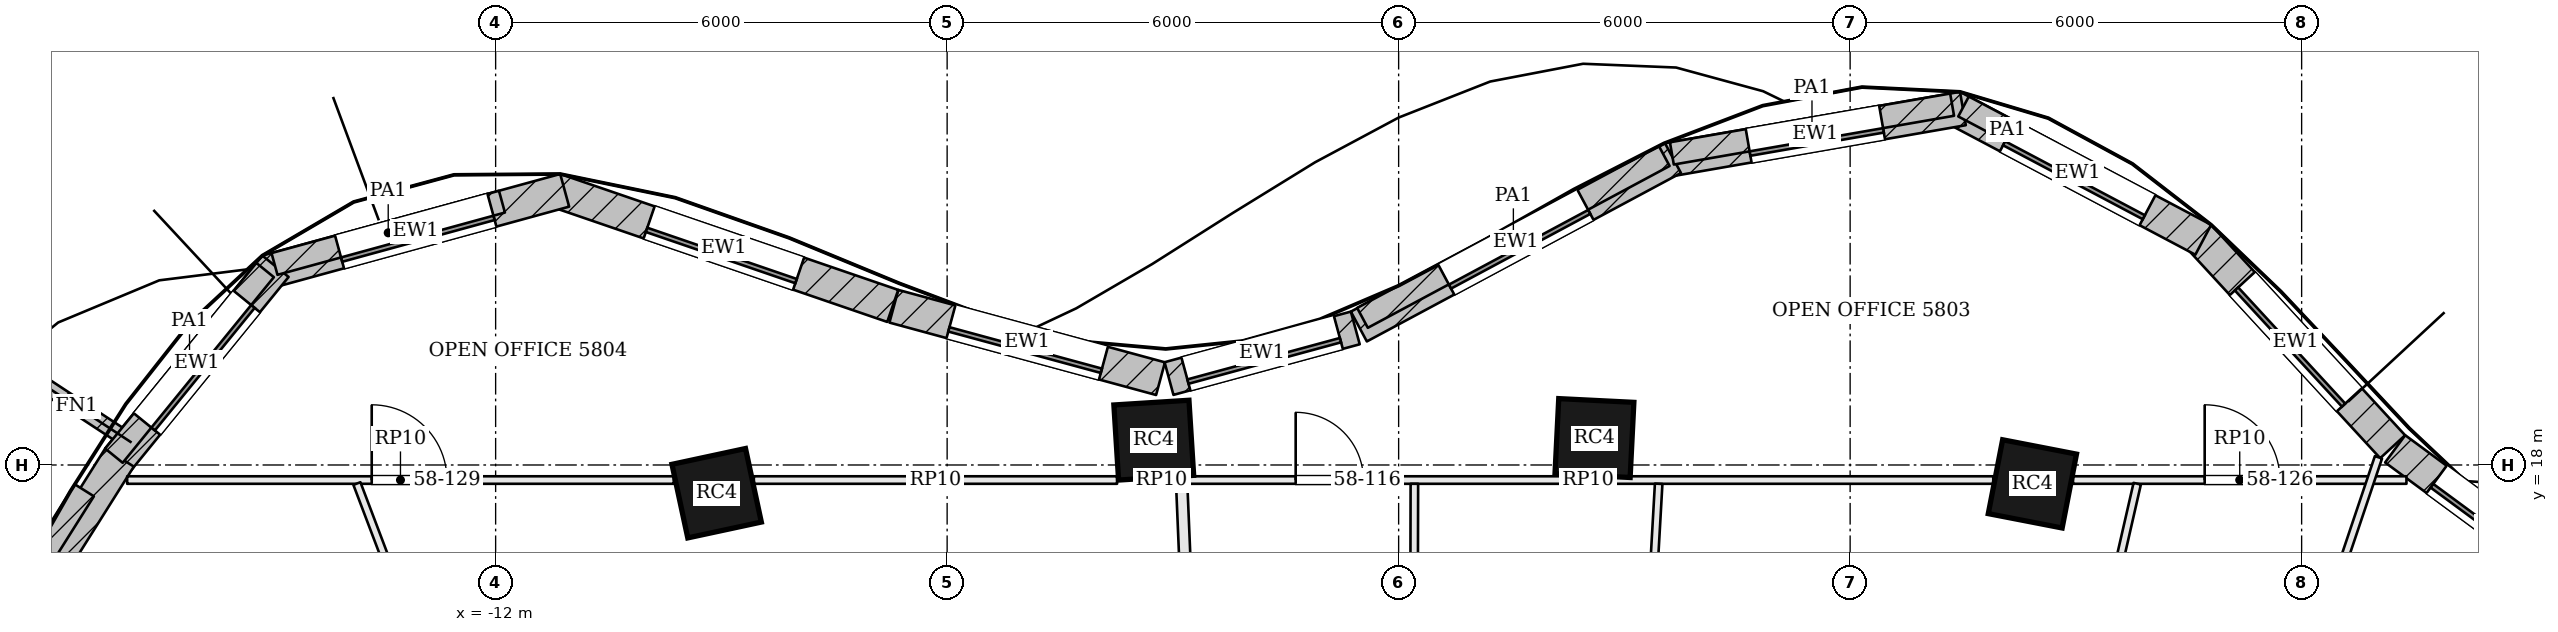
"""IFC4 building model, lengths in metres.
Left out: names, types, materials, properties, quantities, classifications, styles, units other than length and angle.
Written with IfcOpenShell. Run it as: python <this file> out.ifc"""

import sys

from ifc_helpers import new_model, si_unit, direction, frame, frame_2d, origin, origin_2d, place, context, subcontext, project, spatial, rectangle, extrude, element, fill, save


model = new_model("IFC4")
c1 = context("Model", 3, precision=1e-05, world=origin(), true_north=direction((0.0, 1.0)))
c2 = subcontext(c1, "Body", "Model", "MODEL_VIEW")
j1 = project(units=[si_unit("LENGTHUNIT", "METRE"), si_unit("PLANEANGLEUNIT", "RADIAN")], contexts=[c1])
p1 = place(None, origin())
s1 = spatial("IfcSite", under=j1, at=p1, CompositionType="ELEMENT")
p2 = place(p1, origin())
s2 = spatial("IfcBuilding", under=s1, at=p2, CompositionType="ELEMENT")
p3 = place(p2, frame((0.0, 0.0, 237.0)))
s3 = spatial("IfcBuildingStorey", under=s2, at=p3, CompositionType="ELEMENT", Elevation=237.0)
for number, where, z_axis, x_axis in (
    (1, (8.422, 17.749, 0.0), (0.0, 0.0, 1.0), (-0.982, 0.191, 0.0)),
    (2, (2.602, 18.358, 0.0), (0.0, 0.0, 1.0), (-0.999, 0.05, 0.0)),
    (3, (-3.254, 18.33, 0.0), (0.0, 0.0, 1.0), (-0.998, -0.063, 0.0)),
    (4, (-9.063, 17.625, 0.0), (0.0, 0.0, 1.0), (-0.978, -0.21, 0.0)),
):
    element("IfcColumn", number, at=place(p3, frame(where, z_axis=z_axis, x_axis=x_axis)), inside=s3, PredefinedType="COLUMN", context=c2, shape_type="SweptSolid", body=[
        extrude(rectangle(XDim=1.0, YDim=1.0, at=origin_2d()), origin(), (0.0, 0.0, 1.0), 3.9),
    ])
p4 = place(p3, frame((16.036, 16.158, 0.0), z_axis=(0.0, 0.0, 1.0), x_axis=(-0.805181432967, 0.593028549064, 0.0)))
e5 = element("IfcWall", 5, at=p4, inside=s3, PredefinedType="SOLIDWALL", context=c2, shape_type="SweptSolid", body=[
    extrude(rectangle(XDim=3.469, YDim=0.45, at=frame_2d((1.734, 0.0))), origin(), (0.0, 0.0, 1.0), 3.7),
])
p5 = place(p4, frame((0.684, 0.0, 0.9)))
e6 = element("IfcOpeningElement", 6, at=p5, cuts=e5, PredefinedType="OPENING", context=c2, shape_type="SweptSolid", body=[
    extrude(rectangle(XDim=2.1, YDim=2.3, at=frame_2d((1.05, 1.15))), frame((0.0, 0.235, 0.0), z_axis=(0.0, -1.0, 0.0), x_axis=(1.0, 0.0, 0.0)), (0.0, 0.0, 1.0), 0.47),
])
p6 = place(p3, frame((13.209, 18.243, 0.0), z_axis=(0.0, 0.0, 1.0), x_axis=(-0.677612152497, 0.735419452278, 0.0)))
e7 = element("IfcWall", 7, at=p6, inside=s3, PredefinedType="SOLIDWALL", context=c2, shape_type="SweptSolid", body=[
    extrude(rectangle(XDim=3.797, YDim=0.45, at=frame_2d((1.898, 0.0))), origin(), (0.0, 0.0, 1.0), 3.7),
])
p7 = place(p6, frame((0.848, 0.0, 0.9)))
e8 = element("IfcOpeningElement", 8, at=p7, cuts=e7, PredefinedType="OPENING", context=c2, shape_type="SweptSolid", body=[
    extrude(rectangle(XDim=2.1, YDim=2.3, at=frame_2d((1.05, 1.15))), frame((0.0, 0.235, 0.0), z_axis=(0.0, -1.0, 0.0), x_axis=(1.0, 0.0, 0.0)), (0.0, 0.0, 1.0), 0.47),
])
p8 = place(p3, frame((10.693, 20.993, 0.0), z_axis=(0.0, 0.0, 1.0), x_axis=(-0.883817790726, 0.46783128668, 0.0)))
e9 = element("IfcWall", 9, at=p8, inside=s3, PredefinedType="SOLIDWALL", context=c2, shape_type="SweptSolid", body=[
    extrude(rectangle(XDim=3.777, YDim=0.45, at=frame_2d((1.888, 0.0))), origin(), (0.0, 0.0, 1.0), 3.7),
])
p9 = place(p8, frame((0.838, 0.0, 0.9)))
e10 = element("IfcOpeningElement", 10, at=p9, cuts=e9, PredefinedType="OPENING", context=c2, shape_type="SweptSolid", body=[
    extrude(rectangle(XDim=2.1, YDim=2.3, at=frame_2d((1.05, 1.15))), frame((0.0, 0.235, 0.0), z_axis=(0.0, -1.0, 0.0), x_axis=(1.0, 0.0, 0.0)), (0.0, 0.0, 1.0), 0.47),
])
p10 = place(p3, frame((7.499, 22.737, 0.0), z_axis=(0.0, 0.0, 1.0), x_axis=(-0.98521220506, -0.171338585849, 0.0)))
e11 = element("IfcWall", 11, at=p10, inside=s3, PredefinedType="SOLIDWALL", context=c2, shape_type="SweptSolid", body=[
    extrude(rectangle(XDim=3.98, YDim=0.45, at=frame_2d((1.99, 0.0))), origin(), (0.0, 0.0, 1.0), 3.7),
])
p11 = place(p10, frame((1.09, 0.0, 0.9)))
e12 = element("IfcOpeningElement", 12, at=p11, cuts=e11, PredefinedType="OPENING", context=c2, shape_type="SweptSolid", body=[
    extrude(rectangle(XDim=1.8, YDim=2.3, at=frame_2d((0.9, 1.15))), frame((0.0, 0.235, 0.0), z_axis=(0.0, -1.0, 0.0), x_axis=(1.0, 0.0, 0.0)), (0.0, 0.0, 1.0), 0.47),
])
p12 = place(p3, frame((3.646, 22.079, 0.0), z_axis=(0.0, 0.0, 1.0), x_axis=(-0.881279133897, -0.472596115259, 0.0)))
e13 = element("IfcWall", 13, at=p12, inside=s3, PredefinedType="SOLIDWALL", context=c2, shape_type="SweptSolid", body=[
    extrude(rectangle(XDim=4.737, YDim=0.45, at=frame_2d((2.368, 0.0))), origin(), (0.0, 0.0, 1.0), 3.7),
])
p13 = place(p12, frame((1.318, 0.0, 0.9)))
e14 = element("IfcOpeningElement", 14, at=p13, cuts=e13, PredefinedType="OPENING", context=c2, shape_type="SweptSolid", body=[
    extrude(rectangle(XDim=2.1, YDim=2.3, at=frame_2d((1.05, 1.15))), frame((0.0, 0.235, 0.0), z_axis=(0.0, -1.0, 0.0), x_axis=(1.0, 0.0, 0.0)), (0.0, 0.0, 1.0), 0.47),
])
p14 = place(p3, frame((-0.576, 19.821, 0.0), z_axis=(0.0, 0.0, 1.0), x_axis=(-0.965009398019, -0.262215296532, 0.0)))
e15 = element("IfcWall", 15, at=p14, inside=s3, PredefinedType="SOLIDWALL", context=c2, shape_type="SweptSolid", body=[
    extrude(rectangle(XDim=2.565, YDim=0.45, at=frame_2d((1.283, 0.0))), origin(), (0.0, 0.0, 1.0), 3.7),
])
p15 = place(p14, frame((0.233, 0.0, 0.9)))
e16 = element("IfcOpeningElement", 16, at=p15, cuts=e15, PredefinedType="OPENING", context=c2, shape_type="SweptSolid", body=[
    extrude(rectangle(XDim=2.1, YDim=2.3, at=frame_2d((1.05, 1.15))), frame((0.0, 0.235, 0.0), z_axis=(0.0, -1.0, 0.0), x_axis=(1.0, 0.0, 0.0)), (0.0, 0.0, 1.0), 0.47),
])
p16 = place(p3, frame((-3.164, 19.147, 0.0), z_axis=(0.0, 0.0, 1.0), x_axis=(-0.965039479998, 0.262104563191, 0.0)))
e17 = element("IfcWall", 17, at=p16, inside=s3, PredefinedType="SOLIDWALL", context=c2, shape_type="SweptSolid", body=[
    extrude(rectangle(XDim=3.672, YDim=0.45, at=frame_2d((1.836, 0.0))), origin(), (0.0, 0.0, 1.0), 3.7),
])
p17 = place(p16, frame((0.786, 0.0, 0.9)))
e18 = element("IfcOpeningElement", 18, at=p17, cuts=e17, PredefinedType="OPENING", context=c2, shape_type="SweptSolid", body=[
    extrude(rectangle(XDim=2.1, YDim=2.3, at=frame_2d((1.05, 1.15))), frame((0.0, 0.235, 0.0), z_axis=(0.0, -1.0, 0.0), x_axis=(1.0, 0.0, 0.0)), (0.0, 0.0, 1.0), 0.47),
])
p18 = place(p3, frame((-6.723, 20.114, 0.0), z_axis=(0.0, 0.0, 1.0), x_axis=(-0.945947299026, 0.324320377815, 0.0)))
e19 = element("IfcWall", 19, at=p18, inside=s3, PredefinedType="SOLIDWALL", context=c2, shape_type="SweptSolid", body=[
    extrude(rectangle(XDim=4.745, YDim=0.45, at=frame_2d((2.372, 0.0))), origin(), (0.0, 0.0, 1.0), 3.7),
])
p19 = place(p18, frame((1.322, 0.0, 0.9)))
e20 = element("IfcOpeningElement", 20, at=p19, cuts=e19, PredefinedType="OPENING", context=c2, shape_type="SweptSolid", body=[
    extrude(rectangle(XDim=2.1, YDim=2.3, at=frame_2d((1.05, 1.15))), frame((0.0, 0.235, 0.0), z_axis=(0.0, -1.0, 0.0), x_axis=(1.0, 0.0, 0.0)), (0.0, 0.0, 1.0), 0.47),
])
p20 = place(p3, frame((-11.083, 21.65, 0.0), z_axis=(0.0, 0.0, 1.0), x_axis=(-0.964483204983, -0.264144179011, 0.0)))
e21 = element("IfcWall", 21, at=p20, inside=s3, PredefinedType="SOLIDWALL", context=c2, shape_type="SweptSolid", body=[
    extrude(rectangle(XDim=4.104, YDim=0.45, at=frame_2d((2.052, 0.0))), origin(), (0.0, 0.0, 1.0), 3.7),
])
p21 = place(p20, frame((1.002, 0.0, 0.9)))
e22 = element("IfcOpeningElement", 22, at=p21, cuts=e21, PredefinedType="OPENING", context=c2, shape_type="SweptSolid", body=[
    extrude(rectangle(XDim=2.1, YDim=2.3, at=frame_2d((1.05, 1.15))), frame((0.0, 0.235, 0.0), z_axis=(0.0, -1.0, 0.0), x_axis=(1.0, 0.0, 0.0)), (0.0, 0.0, 1.0), 0.47),
])
p22 = place(p3, frame((-14.926, 20.641, 0.0), z_axis=(0.0, 0.0, 1.0), x_axis=(-0.631548074669, -0.775336720001, 0.0)))
e23 = element("IfcWall", 23, at=p22, inside=s3, PredefinedType="SOLIDWALL", context=c2, shape_type="SweptSolid", body=[
    extrude(rectangle(XDim=3.308, YDim=0.45, at=frame_2d((1.654, 0.0))), origin(), (0.0, 0.0, 1.0), 3.7),
])
p23 = place(p22, frame((0.604, 0.0, 0.9)))
e24 = element("IfcOpeningElement", 24, at=p23, cuts=e23, PredefinedType="OPENING", context=c2, shape_type="SweptSolid", body=[
    extrude(rectangle(XDim=2.1, YDim=2.3, at=frame_2d((1.05, 1.15))), frame((0.0, 0.235, 0.0), z_axis=(0.0, -1.0, 0.0), x_axis=(1.0, 0.0, 0.0)), (0.0, 0.0, 1.0), 0.47),
])
p24 = place(p3, frame((-16.998, 18.099, 0.0), z_axis=(0.0, 0.0, 1.0), x_axis=(-0.532745661304, -0.846275404559, 0.0)))
e25 = element("IfcWall", 25, at=p24, inside=s3, PredefinedType="SOLIDWALL", context=c2, shape_type="SweptSolid", body=[
    extrude(rectangle(XDim=5.076, YDim=0.45, at=frame_2d((2.538, 0.0))), origin(), (0.0, 0.0, 1.0), 3.7),
])
p25 = place(p24, frame((1.638, 0.0, 0.9)))
e26 = element("IfcOpeningElement", 26, at=p25, cuts=e25, PredefinedType="OPENING", context=c2, shape_type="SweptSolid", body=[
    extrude(rectangle(XDim=1.8, YDim=2.3, at=frame_2d((0.9, 1.15))), frame((0.0, 0.235, 0.0), z_axis=(0.0, -1.0, 0.0), x_axis=(1.0, 0.0, 0.0)), (0.0, 0.0, 1.0), 0.47),
])
p26 = place(p3, frame((-16.838, 18.298, 0.0), z_axis=(0.0, 0.0, 1.0), x_axis=(-0.835871900419, 0.548924554097, 0.0)))
e27 = element("IfcWall", 27, at=p26, inside=s3, PredefinedType="SOLIDWALL", context=c2, shape_type="SweptSolid", body=[
    extrude(rectangle(XDim=1.75, YDim=0.2, at=frame_2d((0.875, 0.0))), origin(), (0.0, 0.0, 1.0), 3.7),
])
p27 = place(p3, frame((8.682, 22.143, 3.9), z_axis=(0.0, 0.0, 1.0), x_axis=(-0.883787916347, 0.467887720419, 0.0)))
e28 = element("IfcWall", 28, at=p27, inside=s3, PredefinedType="PARAPET", context=c2, shape_type="SweptSolid", body=[
    extrude(rectangle(XDim=1.329, YDim=0.3, at=frame_2d((0.665, 0.0))), origin(), (0.0, 0.0, 1.0), 1.1),
])
p28 = place(p3, frame((7.355, 22.789, 3.9), z_axis=(0.0, 0.0, 1.0), x_axis=(-0.985197529684, -0.171422949176, 0.0)))
e29 = element("IfcWall", 29, at=p28, inside=s3, PredefinedType="PARAPET", context=c2, shape_type="SweptSolid", body=[
    extrude(rectangle(XDim=3.78, YDim=0.3, at=frame_2d((1.89, 0.0))), origin(), (0.0, 0.0, 1.0), 1.1),
])
p29 = place(p3, frame((3.53, 22.106, 3.9), z_axis=(0.0, 0.0, 1.0), x_axis=(-0.881258931682, -0.472633785643, 0.0)))
e30 = element("IfcWall", 30, at=p29, inside=s3, PredefinedType="PARAPET", context=c2, shape_type="SweptSolid", body=[
    extrude(rectangle(XDim=4.55, YDim=0.3, at=frame_2d((2.275, 0.0))), origin(), (0.0, 0.0, 1.0), 1.1),
])
p30 = place(p3, frame((-11.916, 21.5, 3.9), z_axis=(0.0, 0.0, 1.0), x_axis=(-0.964473787466, -0.264178563271, 0.0)))
e31 = element("IfcWall", 31, at=p30, inside=s3, PredefinedType="PARAPET", context=c2, shape_type="SweptSolid", body=[
    extrude(rectangle(XDim=3.134, YDim=0.3, at=frame_2d((1.567, 0.0))), origin(), (0.0, 0.0, 1.0), 1.1),
])
p31 = place(p3, frame((-15.063, 20.591, 3.9), z_axis=(0.0, 0.0, 1.0), x_axis=(-0.631539712948, -0.775343530939, 0.0)))
e32 = element("IfcWall", 32, at=p31, inside=s3, PredefinedType="PARAPET", context=c2, shape_type="SweptSolid", body=[
    extrude(rectangle(XDim=3.182, YDim=0.3, at=frame_2d((1.591, 0.0))), origin(), (0.0, 0.0, 1.0), 1.1),
])
p32 = place(p3, frame((-17.466, 17.664, 3.9), z_axis=(0.0, 0.0, 1.0), x_axis=(-0.532743008157, -0.846277074758, 0.0)))
e33 = element("IfcWall", 33, at=p32, inside=s3, PredefinedType="PARAPET", context=c2, shape_type="SweptSolid", body=[
    extrude(rectangle(XDim=2.581, YDim=0.3, at=frame_2d((1.29, 0.0))), origin(), (0.0, 0.0, 1.0), 1.1),
])
p33 = place(p3, frame((-2.887, 17.832, 0.0), z_axis=(0.0, 0.0, 1.0), x_axis=(0.042070718288, -0.999114635396, 0.0)))
e34 = element("IfcWall", 34, at=p33, inside=s3, PredefinedType="PARTITIONING", context=c2, shape_type="SweptSolid", body=[
    extrude(rectangle(XDim=3.76, YDim=0.15, at=frame_2d((1.88, 0.0))), origin(), (0.0, 0.0, 1.0), 3.184),
])
p34 = place(p3, frame((-2.865, 17.8, 0.0), z_axis=(0.0, 0.0, 1.0), x_axis=(1.0, 0.0, 0.0)))
e35 = element("IfcWall", 35, at=p34, inside=s3, PredefinedType="PARTITIONING", context=c2, shape_type="SweptSolid", body=[
    extrude(rectangle(XDim=10.767, YDim=0.1, at=frame_2d((5.384, 0.0))), origin(), (0.0, 0.0, 1.0), 3.084),
])
p35 = place(p34, frame((1.497, 0.0, 0.0)))
e36 = element("IfcOpeningElement", 36, at=p35, cuts=e35, PredefinedType="OPENING", context=c2, shape_type="SweptSolid", body=[
    extrude(rectangle(XDim=0.9, YDim=2.1, at=frame_2d((0.45, 1.05))), frame((0.0, 0.06, 0.0), z_axis=(0.0, -1.0, 0.0), x_axis=(1.0, 0.0, 0.0)), (0.0, 0.0, 1.0), 0.12),
])
p36 = place(p3, frame((8.962, 17.8, 0.0), z_axis=(0.0, 0.0, 1.0), x_axis=(1.0, 0.0, 0.0)))
e37 = element("IfcWall", 37, at=p36, inside=s3, PredefinedType="PARTITIONING", context=c2, shape_type="SweptSolid", body=[
    extrude(rectangle(XDim=4.431, YDim=0.1, at=frame_2d((2.216, 0.0))), origin(), (0.0, 0.0, 1.0), 3.084),
])
p37 = place(p36, frame((1.75, 0.0, 0.0)))
e38 = element("IfcOpeningElement", 38, at=p37, cuts=e37, PredefinedType="OPENING", context=c2, shape_type="SweptSolid", body=[
    extrude(rectangle(XDim=1.0, YDim=2.4, at=frame_2d((0.5, 1.2))), frame((0.0, 0.06, 0.0), z_axis=(0.0, -1.0, 0.0), x_axis=(1.0, 0.0, 0.0)), (0.0, 0.0, 1.0), 0.12),
])
p38 = place(p3, frame((11.664, 14.071, 0.0), z_axis=(0.0, 0.0, 1.0), x_axis=(0.319050122348, 0.947737843198, 0.0)))
e39 = element("IfcWall", 39, at=p38, inside=s3, PredefinedType="PARTITIONING", context=c2, shape_type="SweptSolid", body=[
    extrude(rectangle(XDim=4.254, YDim=0.1, at=frame_2d((2.127, 0.0))), origin(), (0.0, 0.0, 1.0), 3.084),
])
p39 = place(p3, frame((8.973, 14.073, 0.0), z_axis=(0.0, 0.0, 1.0), x_axis=(0.22309183241, 0.97479743245, 0.0)))
e40 = element("IfcWall", 40, at=p39, inside=s3, PredefinedType="PARTITIONING", context=c2, shape_type="SweptSolid", body=[
    extrude(rectangle(XDim=3.773, YDim=0.1, at=frame_2d((1.887, 0.0))), origin(), (0.0, 0.0, 1.0), 3.084),
])
p40 = place(p3, frame((3.247, 14.075, 0.0), z_axis=(0.0, 0.0, 1.0), x_axis=(0.056641796207, 0.99839456475, 0.0)))
e41 = element("IfcWall", 41, at=p40, inside=s3, PredefinedType="PARTITIONING", context=c2, shape_type="SweptSolid", body=[
    extrude(rectangle(XDim=3.681, YDim=0.1, at=frame_2d((1.84, 0.0))), origin(), (0.0, 0.0, 1.0), 3.084),
])
p41 = place(p3, frame((0.2, 14.075, 0.0), z_axis=(0.0, 0.0, 1.0), x_axis=(0.002325111632, 0.999997296924, 0.0)))
e42 = element("IfcWall", 42, at=p41, inside=s3, PredefinedType="PARTITIONING", context=c2, shape_type="SweptSolid", body=[
    extrude(rectangle(XDim=3.675, YDim=0.1, at=frame_2d((1.837, 0.0))), origin(), (0.0, 0.0, 1.0), 3.084),
])
p42 = place(p3, frame((-16.897, 17.8, 0.0), z_axis=(0.0, 0.0, 1.0), x_axis=(1.0, 0.0, 0.0)))
e43 = element("IfcWall", 43, at=p42, inside=s3, PredefinedType="PARTITIONING", context=c2, shape_type="SweptSolid", body=[
    extrude(rectangle(XDim=7.264, YDim=0.1, at=frame_2d((3.632, 0.0))), origin(), (0.0, 0.0, 1.0), 3.084),
])
p43 = place(p42, frame((3.25, 0.0, 0.0)))
e44 = element("IfcOpeningElement", 44, at=p43, cuts=e43, PredefinedType="OPENING", context=c2, shape_type="SweptSolid", body=[
    extrude(rectangle(XDim=1.0, YDim=2.1, at=frame_2d((0.5, 1.05))), frame((0.0, 0.06, 0.0), z_axis=(0.0, -1.0, 0.0), x_axis=(1.0, 0.0, 0.0)), (0.0, 0.0, 1.0), 0.12),
])
p44 = place(p3, frame((-8.569, 17.8, 0.0), z_axis=(0.0, 0.0, 1.0), x_axis=(1.0, 0.0, 0.0)))
e45 = element("IfcWall", 45, at=p44, inside=s3, PredefinedType="PARTITIONING", context=c2, shape_type="SweptSolid", body=[
    extrude(rectangle(XDim=4.827, YDim=0.1, at=frame_2d((2.414, 0.0))), origin(), (0.0, 0.0, 1.0), 3.084),
])
p45 = place(p3, frame((-3.397, 17.8, 0.0), z_axis=(0.0, 0.0, 1.0), x_axis=(1.0, 0.0, 0.0)))
e46 = element("IfcWall", 46, at=p45, inside=s3, PredefinedType="PARTITIONING", context=c2, shape_type="SweptSolid", body=[
    extrude(rectangle(XDim=0.491, YDim=0.1, at=frame_2d((0.246, 0.0))), origin(), (0.0, 0.0, 1.0), 3.084),
])
p46 = place(p3, frame((-12.447, 14.07, 0.0), z_axis=(0.0, 0.0, 1.0), x_axis=(-0.35453091347, 0.935044293814, 0.0)))
e47 = element("IfcWall", 47, at=p46, inside=s3, PredefinedType="PARTITIONING", context=c2, shape_type="SweptSolid", body=[
    extrude(rectangle(XDim=3.939, YDim=0.1, at=frame_2d((1.969, 0.0))), origin(), (0.0, 0.0, 1.0), 3.084),
])
p47 = place(p5, origin())
e48 = element("IfcWindow", 48, at=p47, inside=s3, PartitioningType="SINGLE_PANEL", PredefinedType="WINDOW", context=c2, shape_type="SweptSolid", body=[
    extrude(rectangle(XDim=2.1, YDim=2.3, at=frame_2d((1.05, 1.15))), frame((0.0, 0.135, 0.0), z_axis=(0.0, -1.0, 0.0), x_axis=(1.0, 0.0, 0.0)), (0.0, 0.0, 1.0), 0.06),
])
fill(e6, e48)
p48 = place(p7, origin())
e49 = element("IfcWindow", 49, at=p48, inside=s3, PartitioningType="SINGLE_PANEL", PredefinedType="WINDOW", context=c2, shape_type="SweptSolid", body=[
    extrude(rectangle(XDim=2.1, YDim=2.3, at=frame_2d((1.05, 1.15))), frame((0.0, 0.135, 0.0), z_axis=(0.0, -1.0, 0.0), x_axis=(1.0, 0.0, 0.0)), (0.0, 0.0, 1.0), 0.06),
])
fill(e8, e49)
p49 = place(p9, origin())
e50 = element("IfcWindow", 50, at=p49, inside=s3, PartitioningType="SINGLE_PANEL", PredefinedType="WINDOW", context=c2, shape_type="SweptSolid", body=[
    extrude(rectangle(XDim=2.1, YDim=2.3, at=frame_2d((1.05, 1.15))), frame((0.0, 0.135, 0.0), z_axis=(0.0, -1.0, 0.0), x_axis=(1.0, 0.0, 0.0)), (0.0, 0.0, 1.0), 0.06),
])
fill(e10, e50)
p50 = place(p11, origin())
e51 = element("IfcWindow", 51, at=p50, inside=s3, PartitioningType="SINGLE_PANEL", PredefinedType="WINDOW", context=c2, shape_type="SweptSolid", body=[
    extrude(rectangle(XDim=1.8, YDim=2.3, at=frame_2d((0.9, 1.15))), frame((0.0, 0.135, 0.0), z_axis=(0.0, -1.0, 0.0), x_axis=(1.0, 0.0, 0.0)), (0.0, 0.0, 1.0), 0.06),
])
fill(e12, e51)
p51 = place(p13, origin())
e52 = element("IfcWindow", 52, at=p51, inside=s3, PartitioningType="SINGLE_PANEL", PredefinedType="WINDOW", context=c2, shape_type="SweptSolid", body=[
    extrude(rectangle(XDim=2.1, YDim=2.3, at=frame_2d((1.05, 1.15))), frame((0.0, 0.135, 0.0), z_axis=(0.0, -1.0, 0.0), x_axis=(1.0, 0.0, 0.0)), (0.0, 0.0, 1.0), 0.06),
])
fill(e14, e52)
p52 = place(p15, origin())
e53 = element("IfcWindow", 53, at=p52, inside=s3, PartitioningType="SINGLE_PANEL", PredefinedType="WINDOW", context=c2, shape_type="SweptSolid", body=[
    extrude(rectangle(XDim=2.1, YDim=2.3, at=frame_2d((1.05, 1.15))), frame((0.0, 0.135, 0.0), z_axis=(0.0, -1.0, 0.0), x_axis=(1.0, 0.0, 0.0)), (0.0, 0.0, 1.0), 0.06),
])
fill(e16, e53)
p53 = place(p17, origin())
e54 = element("IfcWindow", 54, at=p53, inside=s3, PartitioningType="SINGLE_PANEL", PredefinedType="WINDOW", context=c2, shape_type="SweptSolid", body=[
    extrude(rectangle(XDim=2.1, YDim=2.3, at=frame_2d((1.05, 1.15))), frame((0.0, 0.135, 0.0), z_axis=(0.0, -1.0, 0.0), x_axis=(1.0, 0.0, 0.0)), (0.0, 0.0, 1.0), 0.06),
])
fill(e18, e54)
p54 = place(p19, origin())
e55 = element("IfcWindow", 55, at=p54, inside=s3, PartitioningType="SINGLE_PANEL", PredefinedType="WINDOW", context=c2, shape_type="SweptSolid", body=[
    extrude(rectangle(XDim=2.1, YDim=2.3, at=frame_2d((1.05, 1.15))), frame((0.0, 0.135, 0.0), z_axis=(0.0, -1.0, 0.0), x_axis=(1.0, 0.0, 0.0)), (0.0, 0.0, 1.0), 0.06),
])
fill(e20, e55)
p55 = place(p21, origin())
e56 = element("IfcWindow", 56, at=p55, inside=s3, PartitioningType="SINGLE_PANEL", PredefinedType="WINDOW", context=c2, shape_type="SweptSolid", body=[
    extrude(rectangle(XDim=2.1, YDim=2.3, at=frame_2d((1.05, 1.15))), frame((0.0, 0.135, 0.0), z_axis=(0.0, -1.0, 0.0), x_axis=(1.0, 0.0, 0.0)), (0.0, 0.0, 1.0), 0.06),
])
fill(e22, e56)
p56 = place(p23, origin())
e57 = element("IfcWindow", 57, at=p56, inside=s3, PartitioningType="SINGLE_PANEL", PredefinedType="WINDOW", context=c2, shape_type="SweptSolid", body=[
    extrude(rectangle(XDim=2.1, YDim=2.3, at=frame_2d((1.05, 1.15))), frame((0.0, 0.135, 0.0), z_axis=(0.0, -1.0, 0.0), x_axis=(1.0, 0.0, 0.0)), (0.0, 0.0, 1.0), 0.06),
])
fill(e24, e57)
p57 = place(p35, origin())
e58 = element("IfcDoor", 58, at=p57, inside=s3, OperationType="SINGLE_SWING_LEFT", PredefinedType="DOOR", context=c2, shape_type="SweptSolid", body=[
    extrude(rectangle(XDim=0.9, YDim=2.1, at=frame_2d((0.45, 1.05))), frame((0.0, 0.025, 0.0), z_axis=(0.0, -1.0, 0.0), x_axis=(1.0, 0.0, 0.0)), (0.0, 0.0, 1.0), 0.05),
])
fill(e36, e58)
p58 = place(p37, origin())
e59 = element("IfcDoor", 59, at=p58, inside=s3, OperationType="SINGLE_SWING_LEFT", PredefinedType="DOOR", context=c2, shape_type="SweptSolid", body=[
    extrude(rectangle(XDim=1.0, YDim=2.4, at=frame_2d((0.5, 1.2))), frame((0.0, 0.025, 0.0), z_axis=(0.0, -1.0, 0.0), x_axis=(1.0, 0.0, 0.0)), (0.0, 0.0, 1.0), 0.05),
])
fill(e38, e59)
p59 = place(p43, origin())
e60 = element("IfcDoor", 60, at=p59, inside=s3, OperationType="SINGLE_SWING_LEFT", PredefinedType="DOOR", context=c2, shape_type="SweptSolid", body=[
    extrude(rectangle(XDim=1.0, YDim=2.1, at=frame_2d((0.5, 1.05))), frame((0.0, 0.025, 0.0), z_axis=(0.0, -1.0, 0.0), x_axis=(1.0, 0.0, 0.0)), (0.0, 0.0, 1.0), 0.05),
])
fill(e44, e60)
save(model, sys.argv[1])
